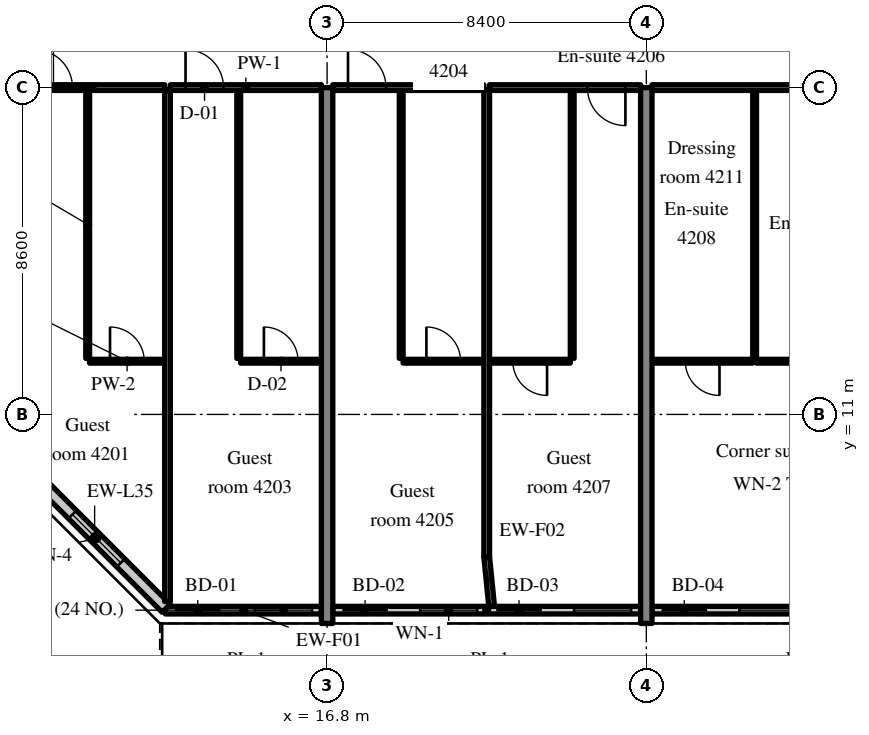
"""IFC4 building model, lengths in metres.
Left out: names, types, materials, properties, quantities, classifications, styles, units other than length and angle.
Written with IfcOpenShell. Run it as: python <this file> out.ifc"""

import sys

from ifc_helpers import new_model, si_unit, direction, frame, frame_2d, origin, place, context, subcontext, project, spatial, rectangle, extrude, source, transform, mapped, element, fill, save


model = new_model("IFC4")
c1 = context("Model", 3, precision=1e-05, world=origin(), true_north=direction((0.0, 1.0)))
c2 = subcontext(c1, "Body", "Model", "MODEL_VIEW")
j1 = project(units=[si_unit("LENGTHUNIT", "METRE"), si_unit("PLANEANGLEUNIT", "RADIAN")], contexts=[c1])
p1 = place(None, origin())
s1 = spatial("IfcSite", under=j1, at=p1, CompositionType="ELEMENT")
p2 = place(p1, origin())
s2 = spatial("IfcBuilding", under=s1, at=p2, CompositionType="ELEMENT")
p3 = place(p2, frame((0.0, 0.0, 174.4)))
s3 = spatial("IfcBuildingStorey", under=s2, at=p3, CompositionType="ELEMENT", Elevation=174.4)
m1 = source(origin(), c2, "Body", "SweptSolid", [
    extrude(rectangle(XDim=14.1, YDim=0.3, at=frame_2d((7.05, 0.0))), origin(), (0.0, 0.0, 1.0), 3.52),
])
for number, where, z_axis, x_axis in (
    (1, (16.8, 5.5, 0.0), (0.0, 0.0, 1.0), (0.0, 1.0, 0.0)),
    (2, (25.2, 5.5, 0.0), (0.0, 0.0, 1.0), (0.0, 1.0, 0.0)),
):
    element("IfcWall", number, at=place(p3, frame(where, z_axis=z_axis, x_axis=x_axis)), inside=s3, PredefinedType="SHEAR", context=c2, shape_type="MappedRepresentation", body=[
        mapped(m1, transform((0.0, 0.0, 0.0), scale=1.0)),
    ])
m2 = source(origin(), c2, "Body", "SweptSolid", [
    extrude(rectangle(XDim=4.105, YDim=0.2, at=frame_2d((2.052, 0.0))), origin(), (0.0, 0.0, 1.0), 2.87),
])
p4 = place(p3, frame((12.545, 5.85, 0.0), z_axis=(0.0, 0.0, 1.0), x_axis=(1.0, 0.0, 0.0)))
e3 = element("IfcWall", 3, at=p4, inside=s3, PredefinedType="SOLIDWALL", context=c2, shape_type="MappedRepresentation", body=[
    mapped(m2, transform((0.0, 0.0, 0.0), scale=1.0)),
])
m3 = source(origin(), c2, "Body", "SweptSolid", [
    extrude(rectangle(XDim=1.2, YDim=2.4, at=frame_2d((0.6, 1.2))), frame((0.0, 0.11, 0.0), z_axis=(0.0, -1.0, 0.0), x_axis=(1.0, 0.0, 0.0)), (0.0, 0.0, 1.0), 0.22),
])
p5 = place(p4, frame((0.25, 0.0, 0.0)))
e4 = element("IfcOpeningElement", 4, at=p5, cuts=e3, PredefinedType="OPENING", context=c2, shape_type="MappedRepresentation", body=[
    mapped(m3, transform((0.0, 0.0, 0.0), scale=1.0)),
])
m4 = source(origin(), c2, "Body", "SweptSolid", [
    extrude(rectangle(XDim=1.5, YDim=1.5, at=frame_2d((0.75, 0.75))), frame((0.0, 0.11, 0.0), z_axis=(0.0, -1.0, 0.0), x_axis=(1.0, 0.0, 0.0)), (0.0, 0.0, 1.0), 0.22),
])
p6 = place(p4, frame((2.355, 0.0, 0.9)))
e5 = element("IfcOpeningElement", 5, at=p6, cuts=e3, PredefinedType="OPENING", context=c2, shape_type="MappedRepresentation", body=[
    mapped(m4, transform((0.0, 0.0, 0.0), scale=1.0)),
])
m5 = source(origin(), c2, "Body", "SweptSolid", [
    extrude(rectangle(XDim=8.1, YDim=0.2, at=frame_2d((4.05, 0.0))), origin(), (0.0, 0.0, 1.0), 2.87),
])
p7 = place(p3, frame((16.95, 5.85, 0.0), z_axis=(0.0, 0.0, 1.0), x_axis=(1.0, 0.0, 0.0)))
e6 = element("IfcWall", 6, at=p7, inside=s3, PredefinedType="SOLIDWALL", context=c2, shape_type="MappedRepresentation", body=[
    mapped(m5, transform((0.0, 0.0, 0.0), scale=1.0)),
])
p8 = place(p7, frame((0.25, 0.0, 0.0)))
e7 = element("IfcOpeningElement", 7, at=p8, cuts=e6, PredefinedType="OPENING", context=c2, shape_type="MappedRepresentation", body=[
    mapped(m3, transform((0.0, 0.0, 0.0), scale=1.0)),
])
p9 = place(p7, frame((2.3, 0.0, 0.9)))
e8 = element("IfcOpeningElement", 8, at=p9, cuts=e6, PredefinedType="OPENING", context=c2, shape_type="MappedRepresentation", body=[
    mapped(m4, transform((0.0, 0.0, 0.0), scale=1.0)),
])
p10 = place(p7, frame((4.3, 0.0, 0.0)))
e9 = element("IfcOpeningElement", 9, at=p10, cuts=e6, PredefinedType="OPENING", context=c2, shape_type="MappedRepresentation", body=[
    mapped(m3, transform((0.0, 0.0, 0.0), scale=1.0)),
])
p11 = place(p7, frame((6.35, 0.0, 0.9)))
e10 = element("IfcOpeningElement", 10, at=p11, cuts=e6, PredefinedType="OPENING", context=c2, shape_type="MappedRepresentation", body=[
    mapped(m4, transform((0.0, 0.0, 0.0), scale=1.0)),
])
m6 = source(origin(), c2, "Body", "SweptSolid", [
    extrude(rectangle(XDim=8.1, YDim=0.2, at=frame_2d((4.05, 0.0))), origin(), (0.0, 0.0, 1.0), 2.87),
])
p12 = place(p3, frame((25.35, 5.85, 0.0), z_axis=(0.0, 0.0, 1.0), x_axis=(1.0, 0.0, 0.0)))
e11 = element("IfcWall", 11, at=p12, inside=s3, PredefinedType="SOLIDWALL", context=c2, shape_type="MappedRepresentation", body=[
    mapped(m6, transform((0.0, 0.0, 0.0), scale=1.0)),
])
p13 = place(p12, frame((0.25, 0.0, 0.0)))
e12 = element("IfcOpeningElement", 12, at=p13, cuts=e11, PredefinedType="OPENING", context=c2, shape_type="MappedRepresentation", body=[
    mapped(m3, transform((0.0, 0.0, 0.0), scale=1.0)),
])
p14 = place(p12, frame((2.3, 0.0, 0.9)))
e13 = element("IfcOpeningElement", 13, at=p14, cuts=e11, PredefinedType="OPENING", context=c2, shape_type="MappedRepresentation", body=[
    mapped(m4, transform((0.0, 0.0, 0.0), scale=1.0)),
])
p15 = place(p12, frame((4.3, 0.0, 0.0)))
e14 = element("IfcOpeningElement", 14, at=p15, cuts=e11, PredefinedType="OPENING", context=c2, shape_type="MappedRepresentation", body=[
    mapped(m3, transform((0.0, 0.0, 0.0), scale=1.0)),
])
p16 = place(p12, frame((6.35, 0.0, 0.9)))
e15 = element("IfcOpeningElement", 15, at=p16, cuts=e11, PredefinedType="OPENING", context=c2, shape_type="MappedRepresentation", body=[
    mapped(m4, transform((0.0, 0.0, 0.0), scale=1.0)),
])
m7 = source(origin(), c2, "Body", "SweptSolid", [
    extrude(rectangle(XDim=5.326, YDim=0.3, at=frame_2d((2.663, 0.0))), origin(), (0.0, 0.0, 1.0), 3.52),
])
p17 = place(p3, frame((8.8, 9.666, 0.0), z_axis=(0.0, 0.0, 1.0), x_axis=(0.707083859269, -0.707129702361, 0.0)))
e16 = element("IfcWall", 16, at=p17, inside=s3, PredefinedType="SOLIDWALL", context=c2, shape_type="MappedRepresentation", body=[
    mapped(m7, transform((0.0, 0.0, 0.0), scale=1.0)),
])
m8 = source(origin(), c2, "Body", "SweptSolid", [
    extrude(rectangle(XDim=1.8, YDim=1.5, at=frame_2d((0.9, 0.75))), frame((0.0, 0.16, 0.0), z_axis=(0.0, -1.0, 0.0), x_axis=(1.0, 0.0, 0.0)), (0.0, 0.0, 1.0), 0.32),
])
p18 = place(p17, frame((1.836, 0.0, 0.9)))
e17 = element("IfcOpeningElement", 17, at=p18, cuts=e16, PredefinedType="OPENING", context=c2, shape_type="MappedRepresentation", body=[
    mapped(m8, transform((0.0, 0.0, 0.0), scale=1.0)),
])
m9 = source(origin(), c2, "Body", "SweptSolid", [
    extrude(rectangle(XDim=7.05, YDim=0.1, at=frame_2d((3.525, 0.0))), origin(), (0.0, 0.0, 1.0), 3.52),
])
p19 = place(p3, frame((10.5, 12.475, 0.0), z_axis=(0.0, 0.0, 1.0), x_axis=(0.0, 1.0, 0.0)))
e18 = element("IfcWall", 18, at=p19, inside=s3, PredefinedType="PARTITIONING", context=c2, shape_type="MappedRepresentation", body=[
    mapped(m9, transform((0.0, 0.0, 0.0), scale=1.0)),
])
m10 = source(origin(), c2, "Body", "SweptSolid", [
    extrude(rectangle(XDim=1.975, YDim=0.1, at=frame_2d((0.987, 0.0))), origin(), (0.0, 0.0, 1.0), 3.52),
])
p20 = place(p3, frame((10.55, 12.4, 0.0), z_axis=(0.0, 0.0, 1.0), x_axis=(1.0, 0.0, 0.0)))
e19 = element("IfcWall", 19, at=p20, inside=s3, PredefinedType="PARTITIONING", context=c2, shape_type="MappedRepresentation", body=[
    mapped(m10, transform((0.0, 0.0, 0.0), scale=1.0)),
])
m11 = source(origin(), c2, "Body", "SweptSolid", [
    extrude(rectangle(XDim=0.9, YDim=2.1, at=frame_2d((0.45, 1.05))), frame((0.0, 0.06, 0.0), z_axis=(0.0, -1.0, 0.0), x_axis=(1.0, 0.0, 0.0)), (0.0, 0.0, 1.0), 0.12),
])
p21 = place(p20, frame((0.538, 0.0, 0.0)))
e20 = element("IfcOpeningElement", 20, at=p21, cuts=e19, PredefinedType="OPENING", context=c2, shape_type="MappedRepresentation", body=[
    mapped(m11, transform((0.0, 0.0, 0.0), scale=1.0)),
])
m12 = source(origin(), c2, "Body", "SweptSolid", [
    extrude(rectangle(XDim=3.825, YDim=0.15, at=frame_2d((1.913, 0.0))), origin(), (0.0, 0.0, 1.0), 2.82),
])
p22 = place(p3, frame((8.7, 19.6, 0.0), z_axis=(0.0, 0.0, 1.0), x_axis=(1.0, 0.0, 0.0)))
e21 = element("IfcWall", 21, at=p22, inside=s3, PredefinedType="PARTITIONING", context=c2, shape_type="MappedRepresentation", body=[
    mapped(m12, transform((0.0, 0.0, 0.0), scale=1.0)),
])
m13 = source(origin(), c2, "Body", "SweptSolid", [
    extrude(rectangle(XDim=1.0, YDim=2.1, at=frame_2d((0.5, 1.05))), frame((0.0, 0.085, 0.0), z_axis=(0.0, -1.0, 0.0), x_axis=(1.0, 0.0, 0.0)), (0.0, 0.0, 1.0), 0.17),
])
p23 = place(p22, frame((0.4, 0.0, 0.0)))
e22 = element("IfcOpeningElement", 22, at=p23, cuts=e21, PredefinedType="OPENING", context=c2, shape_type="MappedRepresentation", body=[
    mapped(m13, transform((0.0, 0.0, 0.0), scale=1.0)),
])
p24 = place(p3, frame((14.475, 12.475, 0.0), z_axis=(0.0, 0.0, 1.0), x_axis=(0.0, 1.0, 0.0)))
e23 = element("IfcWall", 23, at=p24, inside=s3, PredefinedType="PARTITIONING", context=c2, shape_type="MappedRepresentation", body=[
    mapped(m9, transform((0.0, 0.0, 0.0), scale=1.0)),
])
m14 = source(origin(), c2, "Body", "SweptSolid", [
    extrude(rectangle(XDim=2.125, YDim=0.1, at=frame_2d((1.062, 0.0))), origin(), (0.0, 0.0, 1.0), 3.52),
])
p25 = place(p3, frame((14.525, 12.4, 0.0), z_axis=(0.0, 0.0, 1.0), x_axis=(1.0, 0.0, 0.0)))
e24 = element("IfcWall", 24, at=p25, inside=s3, PredefinedType="PARTITIONING", context=c2, shape_type="MappedRepresentation", body=[
    mapped(m14, transform((0.0, 0.0, 0.0), scale=1.0)),
])
p26 = place(p25, frame((0.612, 0.0, 0.0)))
e25 = element("IfcOpeningElement", 25, at=p26, cuts=e24, PredefinedType="OPENING", context=c2, shape_type="MappedRepresentation", body=[
    mapped(m11, transform((0.0, 0.0, 0.0), scale=1.0)),
])
m15 = source(origin(), c2, "Body", "SweptSolid", [
    extrude(rectangle(XDim=3.975, YDim=0.15, at=frame_2d((1.987, 0.0))), origin(), (0.0, 0.0, 1.0), 2.82),
])
p27 = place(p3, frame((12.675, 19.6, 0.0), z_axis=(0.0, 0.0, 1.0), x_axis=(1.0, 0.0, 0.0)))
e26 = element("IfcWall", 26, at=p27, inside=s3, PredefinedType="PARTITIONING", context=c2, shape_type="MappedRepresentation", body=[
    mapped(m15, transform((0.0, 0.0, 0.0), scale=1.0)),
])
p28 = place(p27, frame((0.4, 0.0, 0.0)))
e27 = element("IfcOpeningElement", 27, at=p28, cuts=e26, PredefinedType="OPENING", context=c2, shape_type="MappedRepresentation", body=[
    mapped(m13, transform((0.0, 0.0, 0.0), scale=1.0)),
])
m16 = source(origin(), c2, "Body", "SweptSolid", [
    extrude(rectangle(XDim=13.447, YDim=0.15, at=frame_2d((6.724, 0.0))), origin(), (0.0, 0.0, 1.0), 3.52),
])
p29 = place(p3, frame((12.6, 6.078, 0.0), z_axis=(0.0, 0.0, 1.0), x_axis=(0.0, 1.0, 0.0)))
e28 = element("IfcWall", 28, at=p29, inside=s3, PredefinedType="PARTITIONING", context=c2, shape_type="MappedRepresentation", body=[
    mapped(m16, transform((0.0, 0.0, 0.0), scale=1.0)),
])
p30 = place(p3, frame((18.75, 12.475, 0.0), z_axis=(0.0, 0.0, 1.0), x_axis=(0.0, 1.0, 0.0)))
e29 = element("IfcWall", 29, at=p30, inside=s3, PredefinedType="PARTITIONING", context=c2, shape_type="MappedRepresentation", body=[
    mapped(m9, transform((0.0, 0.0, 0.0), scale=1.0)),
])
p31 = place(p3, frame((18.8, 12.4, 0.0), z_axis=(0.0, 0.0, 1.0), x_axis=(1.0, 0.0, 0.0)))
e30 = element("IfcWall", 30, at=p31, inside=s3, PredefinedType="PARTITIONING", context=c2, shape_type="MappedRepresentation", body=[
    mapped(m14, transform((0.0, 0.0, 0.0), scale=1.0)),
])
p32 = place(p31, frame((0.613, 0.0, 0.0)))
e31 = element("IfcOpeningElement", 31, at=p32, cuts=e30, PredefinedType="OPENING", context=c2, shape_type="MappedRepresentation", body=[
    mapped(m11, transform((0.0, 0.0, 0.0), scale=1.0)),
])
m17 = source(origin(), c2, "Body", "SweptSolid", [
    extrude(rectangle(XDim=3.975, YDim=0.15, at=frame_2d((1.988, 0.0))), origin(), (0.0, 0.0, 1.0), 2.82),
])
p33 = place(p3, frame((16.95, 19.6, 0.0), z_axis=(0.0, 0.0, 1.0), x_axis=(1.0, 0.0, 0.0)))
e32 = element("IfcWall", 32, at=p33, inside=s3, PredefinedType="PARTITIONING", context=c2, shape_type="MappedRepresentation", body=[
    mapped(m17, transform((0.0, 0.0, 0.0), scale=1.0)),
])
p34 = place(p33, frame((0.4, 0.0, 0.0)))
e33 = element("IfcOpeningElement", 33, at=p34, cuts=e32, PredefinedType="OPENING", context=c2, shape_type="MappedRepresentation", body=[
    mapped(m13, transform((0.0, 0.0, 0.0), scale=1.0)),
])
p35 = place(p3, frame((23.25, 12.475, 0.0), z_axis=(0.0, 0.0, 1.0), x_axis=(0.0, 1.0, 0.0)))
e34 = element("IfcWall", 34, at=p35, inside=s3, PredefinedType="PARTITIONING", context=c2, shape_type="MappedRepresentation", body=[
    mapped(m9, transform((0.0, 0.0, 0.0), scale=1.0)),
])
p36 = place(p3, frame((21.075, 12.4, 0.0), z_axis=(0.0, 0.0, 1.0), x_axis=(1.0, 0.0, 0.0)))
e35 = element("IfcWall", 35, at=p36, inside=s3, PredefinedType="PARTITIONING", context=c2, shape_type="MappedRepresentation", body=[
    mapped(m14, transform((0.0, 0.0, 0.0), scale=1.0)),
])
p37 = place(p36, frame((0.613, 0.0, 0.0)))
e36 = element("IfcOpeningElement", 36, at=p37, cuts=e35, PredefinedType="OPENING", context=c2, shape_type="MappedRepresentation", body=[
    mapped(m11, transform((0.0, 0.0, 0.0), scale=1.0)),
])
p38 = place(p3, frame((21.075, 19.6, 0.0), z_axis=(0.0, 0.0, 1.0), x_axis=(1.0, 0.0, 0.0)))
e37 = element("IfcWall", 37, at=p38, inside=s3, PredefinedType="PARTITIONING", context=c2, shape_type="MappedRepresentation", body=[
    mapped(m17, transform((0.0, 0.0, 0.0), scale=1.0)),
])
p39 = place(p38, frame((2.575, 0.0, 0.0)))
e38 = element("IfcOpeningElement", 38, at=p39, cuts=e37, PredefinedType="OPENING", context=c2, shape_type="MappedRepresentation", body=[
    mapped(m13, transform((0.0, 0.0, 0.0), scale=1.0)),
])
m18 = source(origin(), c2, "Body", "SweptSolid", [
    extrude(rectangle(XDim=12.275, YDim=0.15, at=frame_2d((6.137, 0.0))), origin(), (0.0, 0.0, 1.0), 3.52),
])
p40 = place(p3, frame((21.0, 7.25, 0.0), z_axis=(0.0, 0.0, 1.0), x_axis=(0.0, 1.0, 0.0)))
e39 = element("IfcWall", 39, at=p40, inside=s3, PredefinedType="PARTITIONING", context=c2, shape_type="MappedRepresentation", body=[
    mapped(m18, transform((0.0, 0.0, 0.0), scale=1.0)),
])
p41 = place(p3, frame((28.05, 12.475, 0.0), z_axis=(0.0, 0.0, 1.0), x_axis=(0.0, 1.0, 0.0)))
e40 = element("IfcWall", 40, at=p41, inside=s3, PredefinedType="PARTITIONING", context=c2, shape_type="MappedRepresentation", body=[
    mapped(m9, transform((0.0, 0.0, 0.0), scale=1.0)),
])
m19 = source(origin(), c2, "Body", "SweptSolid", [
    extrude(rectangle(XDim=3.5, YDim=0.1, at=frame_2d((1.75, 0.0))), origin(), (0.0, 0.0, 1.0), 3.52),
])
p42 = place(p3, frame((28.1, 12.4, 0.0), z_axis=(0.0, 0.0, 1.0), x_axis=(1.0, 0.0, 0.0)))
e41 = element("IfcWall", 41, at=p42, inside=s3, PredefinedType="PARTITIONING", context=c2, shape_type="MappedRepresentation", body=[
    mapped(m19, transform((0.0, 0.0, 0.0), scale=1.0)),
])
p43 = place(p42, frame((1.3, 0.0, 0.0)))
e42 = element("IfcOpeningElement", 42, at=p43, cuts=e41, PredefinedType="OPENING", context=c2, shape_type="MappedRepresentation", body=[
    mapped(m11, transform((0.0, 0.0, 0.0), scale=1.0)),
])
m20 = source(origin(), c2, "Body", "SweptSolid", [
    extrude(rectangle(XDim=2.65, YDim=0.1, at=frame_2d((1.325, 0.0))), origin(), (0.0, 0.0, 1.0), 3.52),
])
p44 = place(p3, frame((25.35, 12.4, 0.0), z_axis=(0.0, 0.0, 1.0), x_axis=(1.0, 0.0, 0.0)))
e43 = element("IfcWall", 43, at=p44, inside=s3, PredefinedType="PARTITIONING", context=c2, shape_type="MappedRepresentation", body=[
    mapped(m20, transform((0.0, 0.0, 0.0), scale=1.0)),
])
p45 = place(p44, frame((0.875, 0.0, 0.0)))
e44 = element("IfcOpeningElement", 44, at=p45, cuts=e43, PredefinedType="OPENING", context=c2, shape_type="MappedRepresentation", body=[
    mapped(m11, transform((0.0, 0.0, 0.0), scale=1.0)),
])
m21 = source(origin(), c2, "Body", "SweptSolid", [
    extrude(rectangle(XDim=8.1, YDim=0.15, at=frame_2d((4.05, 0.0))), origin(), (0.0, 0.0, 1.0), 2.82),
])
p46 = place(p3, frame((25.35, 19.6, 0.0), z_axis=(0.0, 0.0, 1.0), x_axis=(1.0, 0.0, 0.0)))
e45 = element("IfcWall", 45, at=p46, inside=s3, PredefinedType="PARTITIONING", context=c2, shape_type="MappedRepresentation", body=[
    mapped(m21, transform((0.0, 0.0, 0.0), scale=1.0)),
])
p47 = place(p46, frame((6.7, 0.0, 0.0)))
e46 = element("IfcOpeningElement", 46, at=p47, cuts=e45, PredefinedType="OPENING", context=c2, shape_type="MappedRepresentation", body=[
    mapped(m13, transform((0.0, 0.0, 0.0), scale=1.0)),
])
m22 = source(origin(), c2, "Body", "SweptSolid", [
    extrude(rectangle(XDim=1.307, YDim=0.15, at=frame_2d((0.653, 0.0))), origin(), (0.0, 0.0, 1.0), 3.52),
])
p48 = place(p3, frame((21.13, 5.95, 0.0), z_axis=(0.0, 0.0, 1.0), x_axis=(-0.099411212066, 0.995046436562, 0.0)))
e47 = element("IfcWall", 47, at=p48, inside=s3, PredefinedType="PARTITIONING", context=c2, shape_type="MappedRepresentation", body=[
    mapped(m22, transform((0.0, 0.0, 0.0), scale=1.0)),
])
m23 = source(origin(), c2, "Body", "SweptSolid", [
    extrude(rectangle(XDim=1.2, YDim=2.4, at=frame_2d((0.6, 1.2))), frame((0.0, 0.025, 0.0), z_axis=(0.0, -1.0, 0.0), x_axis=(1.0, 0.0, 0.0)), (0.0, 0.0, 1.0), 0.05),
])
p49 = place(p5, origin())
e48 = element("IfcDoor", 48, at=p49, inside=s3, OperationType="SLIDING_TO_LEFT", PredefinedType="DOOR", context=c2, shape_type="MappedRepresentation", body=[
    mapped(m23, transform((0.0, 0.0, 0.0), scale=1.0)),
])
fill(e4, e48)
m24 = source(origin(), c2, "Body", "SweptSolid", [
    extrude(rectangle(XDim=1.5, YDim=1.5, at=frame_2d((0.75, 0.75))), frame((0.0, 0.03, 0.0), z_axis=(0.0, -1.0, 0.0), x_axis=(1.0, 0.0, 0.0)), (0.0, 0.0, 1.0), 0.06),
])
p50 = place(p6, origin())
e49 = element("IfcWindow", 49, at=p50, inside=s3, PartitioningType="SINGLE_PANEL", PredefinedType="WINDOW", context=c2, shape_type="MappedRepresentation", body=[
    mapped(m24, transform((0.0, 0.0, 0.0), scale=1.0)),
])
fill(e5, e49)
p51 = place(p8, origin())
e50 = element("IfcDoor", 50, at=p51, inside=s3, OperationType="SLIDING_TO_RIGHT", PredefinedType="DOOR", context=c2, shape_type="MappedRepresentation", body=[
    mapped(m23, transform((0.0, 0.0, 0.0), scale=1.0)),
])
fill(e7, e50)
p52 = place(p9, origin())
e51 = element("IfcWindow", 51, at=p52, inside=s3, PartitioningType="SINGLE_PANEL", PredefinedType="WINDOW", context=c2, shape_type="MappedRepresentation", body=[
    mapped(m24, transform((0.0, 0.0, 0.0), scale=1.0)),
])
fill(e8, e51)
p53 = place(p10, origin())
e52 = element("IfcDoor", 52, at=p53, inside=s3, OperationType="SLIDING_TO_LEFT", PredefinedType="DOOR", context=c2, shape_type="MappedRepresentation", body=[
    mapped(m23, transform((0.0, 0.0, 0.0), scale=1.0)),
])
fill(e9, e52)
p54 = place(p11, origin())
e53 = element("IfcWindow", 53, at=p54, inside=s3, PartitioningType="SINGLE_PANEL", PredefinedType="WINDOW", context=c2, shape_type="MappedRepresentation", body=[
    mapped(m24, transform((0.0, 0.0, 0.0), scale=1.0)),
])
fill(e10, e53)
p55 = place(p13, origin())
e54 = element("IfcDoor", 54, at=p55, inside=s3, OperationType="SLIDING_TO_RIGHT", PredefinedType="DOOR", context=c2, shape_type="MappedRepresentation", body=[
    mapped(m23, transform((0.0, 0.0, 0.0), scale=1.0)),
])
fill(e12, e54)
p56 = place(p14, origin())
e55 = element("IfcWindow", 55, at=p56, inside=s3, PartitioningType="SINGLE_PANEL", PredefinedType="WINDOW", context=c2, shape_type="MappedRepresentation", body=[
    mapped(m24, transform((0.0, 0.0, 0.0), scale=1.0)),
])
fill(e13, e55)
m25 = source(origin(), c2, "Body", "SweptSolid", [
    extrude(rectangle(XDim=1.8, YDim=1.5, at=frame_2d((0.9, 0.75))), frame((0.0, 0.03, 0.0), z_axis=(0.0, -1.0, 0.0), x_axis=(1.0, 0.0, 0.0)), (0.0, 0.0, 1.0), 0.06),
])
p57 = place(p18, origin())
e56 = element("IfcWindow", 56, at=p57, inside=s3, PartitioningType="SINGLE_PANEL", PredefinedType="WINDOW", context=c2, shape_type="MappedRepresentation", body=[
    mapped(m25, transform((0.0, 0.0, 0.0), scale=1.0)),
])
fill(e17, e56)
m26 = source(origin(), c2, "Body", "SweptSolid", [
    extrude(rectangle(XDim=0.9, YDim=2.1, at=frame_2d((0.45, 1.05))), frame((0.0, 0.025, 0.0), z_axis=(0.0, -1.0, 0.0), x_axis=(1.0, 0.0, 0.0)), (0.0, 0.0, 1.0), 0.05),
])
p58 = place(p21, origin())
e57 = element("IfcDoor", 57, at=p58, inside=s3, OperationType="SINGLE_SWING_LEFT", PredefinedType="DOOR", context=c2, shape_type="MappedRepresentation", body=[
    mapped(m26, transform((0.0, 0.0, 0.0), scale=1.0)),
])
fill(e20, e57)
m27 = source(origin(), c2, "Body", "SweptSolid", [
    extrude(rectangle(XDim=1.0, YDim=2.1, at=frame_2d((0.5, 1.05))), frame((0.0, 0.025, 0.0), z_axis=(0.0, -1.0, 0.0), x_axis=(1.0, 0.0, 0.0)), (0.0, 0.0, 1.0), 0.05),
])
p59 = place(p23, origin())
e58 = element("IfcDoor", 58, at=p59, inside=s3, OperationType="SINGLE_SWING_LEFT", PredefinedType="DOOR", context=c2, shape_type="MappedRepresentation", body=[
    mapped(m27, transform((0.0, 0.0, 0.0), scale=1.0)),
])
fill(e22, e58)
p60 = place(p26, origin())
e59 = element("IfcDoor", 59, at=p60, inside=s3, OperationType="SINGLE_SWING_LEFT", PredefinedType="DOOR", context=c2, shape_type="MappedRepresentation", body=[
    mapped(m26, transform((0.0, 0.0, 0.0), scale=1.0)),
])
fill(e25, e59)
p61 = place(p28, origin())
e60 = element("IfcDoor", 60, at=p61, inside=s3, OperationType="SINGLE_SWING_LEFT", PredefinedType="DOOR", context=c2, shape_type="MappedRepresentation", body=[
    mapped(m27, transform((0.0, 0.0, 0.0), scale=1.0)),
])
fill(e27, e60)
p62 = place(p32, origin())
e61 = element("IfcDoor", 61, at=p62, inside=s3, OperationType="SINGLE_SWING_LEFT", PredefinedType="DOOR", context=c2, shape_type="MappedRepresentation", body=[
    mapped(m26, transform((0.0, 0.0, 0.0), scale=1.0)),
])
fill(e31, e61)
p63 = place(p34, origin())
e62 = element("IfcDoor", 62, at=p63, inside=s3, OperationType="SINGLE_SWING_LEFT", PredefinedType="DOOR", context=c2, shape_type="MappedRepresentation", body=[
    mapped(m27, transform((0.0, 0.0, 0.0), scale=1.0)),
])
fill(e33, e62)
p64 = place(p37, origin())
e63 = element("IfcDoor", 63, at=p64, inside=s3, OperationType="SINGLE_SWING_RIGHT", PredefinedType="DOOR", context=c2, shape_type="MappedRepresentation", body=[
    mapped(m26, transform((0.0, 0.0, 0.0), scale=1.0)),
])
fill(e36, e63)
p65 = place(p39, origin())
e64 = element("IfcDoor", 64, at=p65, inside=s3, OperationType="SINGLE_SWING_RIGHT", PredefinedType="DOOR", context=c2, shape_type="MappedRepresentation", body=[
    mapped(m27, transform((0.0, 0.0, 0.0), scale=1.0)),
])
fill(e38, e64)
p66 = place(p45, origin())
e65 = element("IfcDoor", 65, at=p66, inside=s3, OperationType="SINGLE_SWING_RIGHT", PredefinedType="DOOR", context=c2, shape_type="MappedRepresentation", body=[
    mapped(m26, transform((0.0, 0.0, 0.0), scale=1.0)),
])
fill(e44, e65)
save(model, sys.argv[1])
